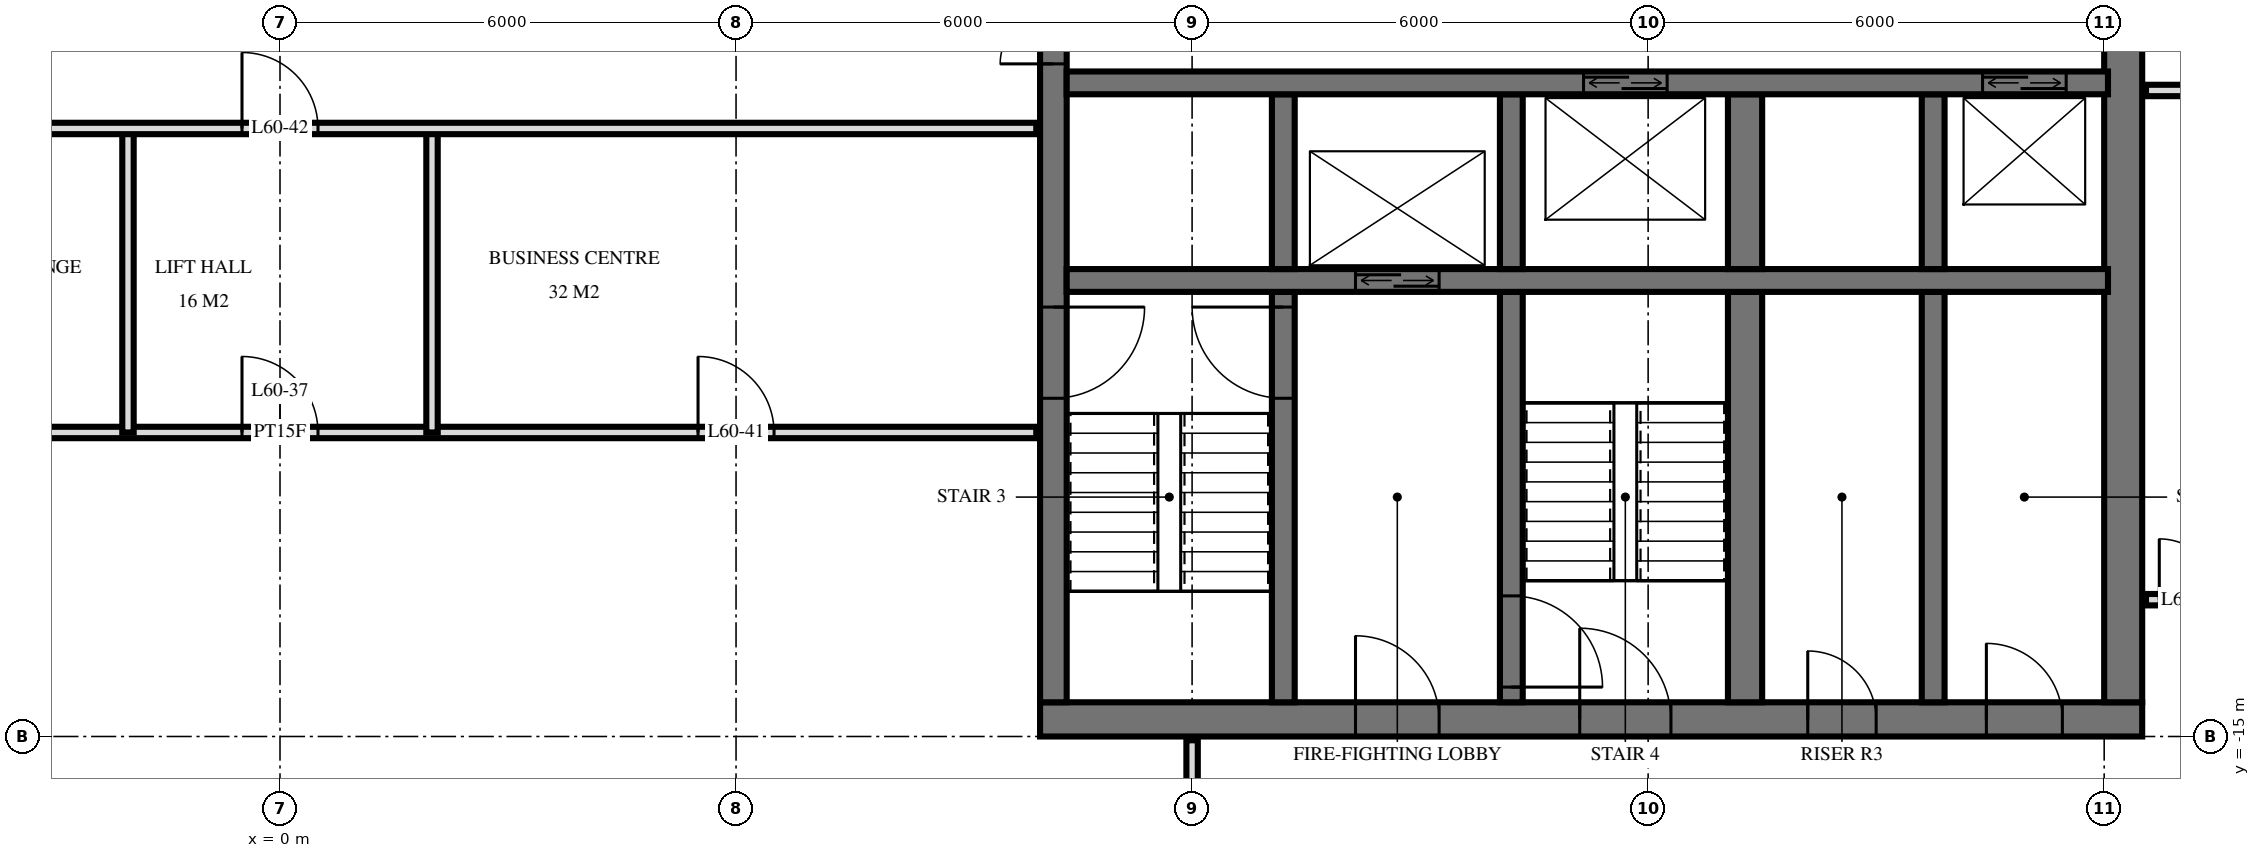
"""IFC4 building model, lengths in metres.
Left out: names, types, materials, properties, quantities, classifications, styles, units other than length and angle.
Written with IfcOpenShell. Run it as: python <this file> out.ifc"""

import sys

from ifc_helpers import new_model, si_unit, direction, frame, frame_2d, origin, place, context, subcontext, project, spatial, rectangle, extrude, element, fill, save


model = new_model("IFC4")
c1 = context("Model", 3, precision=1e-05, world=origin(), true_north=direction((0.0, 1.0)))
c2 = subcontext(c1, "Body", "Model", "MODEL_VIEW")
j1 = project(units=[si_unit("LENGTHUNIT", "METRE"), si_unit("PLANEANGLEUNIT", "RADIAN")], contexts=[c1])
p1 = place(None, origin())
s1 = spatial("IfcSite", under=j1, at=p1, CompositionType="ELEMENT")
p2 = place(p1, origin())
s2 = spatial("IfcBuilding", under=s1, at=p2, CompositionType="ELEMENT")
p3 = place(p2, frame((0.0, 0.0, 229.1)))
s3 = spatial("IfcBuildingStorey", under=s2, at=p3, CompositionType="ELEMENT", Elevation=229.1)
p4 = place(p3, frame((10.0, -14.775, 0.0), z_axis=(0.0, 0.0, 1.0), x_axis=(1.0, 0.0, 0.0)))
e1 = element("IfcWall", 1, at=p4, inside=s3, PredefinedType="SHEAR", context=c2, shape_type="SweptSolid", body=[
    extrude(rectangle(XDim=14.5, YDim=0.45, at=frame_2d((7.25, 0.0))), origin(), (0.0, 0.0, 1.0), 3.5),
])
p5 = place(p4, frame((7.1, 0.0, 0.0)))
e2 = element("IfcOpeningElement", 2, at=p5, cuts=e1, PredefinedType="OPENING", context=c2, shape_type="SweptSolid", body=[
    extrude(rectangle(XDim=1.2, YDim=2.1, at=frame_2d((0.6, 1.05))), frame((0.0, 0.235, 0.0), z_axis=(0.0, -1.0, 0.0), x_axis=(1.0, 0.0, 0.0)), (0.0, 0.0, 1.0), 0.47),
])
p6 = place(p4, frame((4.15, 0.0, 0.0)))
e3 = element("IfcOpeningElement", 3, at=p6, cuts=e1, PredefinedType="OPENING", context=c2, shape_type="SweptSolid", body=[
    extrude(rectangle(XDim=1.1, YDim=2.1, at=frame_2d((0.55, 1.05))), frame((0.0, 0.235, 0.0), z_axis=(0.0, -1.0, 0.0), x_axis=(1.0, 0.0, 0.0)), (0.0, 0.0, 1.0), 0.47),
])
p7 = place(p4, frame((10.1, 0.0, 0.0)))
e4 = element("IfcOpeningElement", 4, at=p7, cuts=e1, PredefinedType="OPENING", context=c2, shape_type="SweptSolid", body=[
    extrude(rectangle(XDim=0.9, YDim=2.1, at=frame_2d((0.45, 1.05))), frame((0.0, 0.235, 0.0), z_axis=(0.0, -1.0, 0.0), x_axis=(1.0, 0.0, 0.0)), (0.0, 0.0, 1.0), 0.47),
])
p8 = place(p4, frame((12.45, 0.0, 0.0)))
e5 = element("IfcOpeningElement", 5, at=p8, cuts=e1, PredefinedType="OPENING", context=c2, shape_type="SweptSolid", body=[
    extrude(rectangle(XDim=1.0, YDim=2.1, at=frame_2d((0.5, 1.05))), frame((0.0, 0.235, 0.0), z_axis=(0.0, -1.0, 0.0), x_axis=(1.0, 0.0, 0.0)), (0.0, 0.0, 1.0), 0.47),
])
p9 = place(p3, frame((10.175, -14.55, 0.0), z_axis=(0.0, 0.0, 1.0), x_axis=(0.0, 1.0, 0.0)))
e6 = element("IfcWall", 6, at=p9, inside=s3, PredefinedType="SHEAR", context=c2, shape_type="SweptSolid", body=[
    extrude(rectangle(XDim=14.1, YDim=0.35, at=frame_2d((7.05, 0.0))), origin(), (0.0, 0.0, 1.0), 3.5),
])
p10 = place(p9, frame((8.4, 0.0, 0.0)))
e7 = element("IfcOpeningElement", 7, at=p10, cuts=e6, PredefinedType="OPENING", context=c2, shape_type="SweptSolid", body=[
    extrude(rectangle(XDim=1.4, YDim=2.4, at=frame_2d((0.7, 1.2))), frame((0.0, 0.185, 0.0), z_axis=(0.0, -1.0, 0.0), x_axis=(1.0, 0.0, 0.0)), (0.0, 0.0, 1.0), 0.37),
])
p11 = place(p9, frame((10.0, 0.0, 0.0)))
e8 = element("IfcOpeningElement", 8, at=p11, cuts=e6, PredefinedType="OPENING", context=c2, shape_type="SweptSolid", body=[
    extrude(rectangle(XDim=1.4, YDim=2.4, at=frame_2d((0.7, 1.2))), frame((0.0, 0.185, 0.0), z_axis=(0.0, -1.0, 0.0), x_axis=(1.0, 0.0, 0.0)), (0.0, 0.0, 1.0), 0.37),
])
p12 = place(p9, frame((4.0, 0.0, 0.0)))
e9 = element("IfcOpeningElement", 9, at=p12, cuts=e6, PredefinedType="OPENING", context=c2, shape_type="SweptSolid", body=[
    extrude(rectangle(XDim=1.2, YDim=2.1, at=frame_2d((0.6, 1.05))), frame((0.0, 0.185, 0.0), z_axis=(0.0, -1.0, 0.0), x_axis=(1.0, 0.0, 0.0)), (0.0, 0.0, 1.0), 0.37),
])
p13 = place(p3, frame((24.25, -14.55, 0.0), z_axis=(0.0, 0.0, 1.0), x_axis=(0.0, 1.0, 0.0)))
e10 = element("IfcWall", 10, at=p13, inside=s3, PredefinedType="SHEAR", context=c2, shape_type="SweptSolid", body=[
    extrude(rectangle(XDim=14.1, YDim=0.5, at=frame_2d((7.05, 0.0))), origin(), (0.0, 0.0, 1.0), 3.5),
])
p14 = place(p3, frame((10.35, -6.4, 0.0), z_axis=(0.0, 0.0, 1.0), x_axis=(1.0, 0.0, 0.0)))
e11 = element("IfcWall", 11, at=p14, inside=s3, PredefinedType="SHEAR", context=c2, shape_type="SweptSolid", body=[
    extrude(rectangle(XDim=13.7, YDim=0.3, at=frame_2d((6.85, 0.0))), origin(), (0.0, 0.0, 1.0), 3.5),
])
p15 = place(p14, frame((12.05, 0.0, 0.0)))
e12 = element("IfcOpeningElement", 12, at=p15, cuts=e11, PredefinedType="OPENING", context=c2, shape_type="SweptSolid", body=[
    extrude(rectangle(XDim=1.1, YDim=2.1, at=frame_2d((0.55, 1.05))), frame((0.0, 0.16, 0.0), z_axis=(0.0, -1.0, 0.0), x_axis=(1.0, 0.0, 0.0)), (0.0, 0.0, 1.0), 0.32),
])
p16 = place(p14, frame((6.8, 0.0, 0.0)))
e13 = element("IfcOpeningElement", 13, at=p16, cuts=e11, PredefinedType="OPENING", context=c2, shape_type="SweptSolid", body=[
    extrude(rectangle(XDim=1.1, YDim=2.1, at=frame_2d((0.55, 1.05))), frame((0.0, 0.16, 0.0), z_axis=(0.0, -1.0, 0.0), x_axis=(1.0, 0.0, 0.0)), (0.0, 0.0, 1.0), 0.32),
])
p17 = place(p3, frame((10.35, -9.0, 0.0), z_axis=(0.0, 0.0, 1.0), x_axis=(1.0, 0.0, 0.0)))
e14 = element("IfcWall", 14, at=p17, inside=s3, PredefinedType="SHEAR", context=c2, shape_type="SweptSolid", body=[
    extrude(rectangle(XDim=13.7, YDim=0.3, at=frame_2d((6.85, 0.0))), origin(), (0.0, 0.0, 1.0), 3.5),
])
p18 = place(p17, frame((3.8, 0.0, 0.0)))
e15 = element("IfcOpeningElement", 15, at=p18, cuts=e14, PredefinedType="OPENING", context=c2, shape_type="SweptSolid", body=[
    extrude(rectangle(XDim=1.1, YDim=2.1, at=frame_2d((0.55, 1.05))), frame((0.0, 0.16, 0.0), z_axis=(0.0, -1.0, 0.0), x_axis=(1.0, 0.0, 0.0)), (0.0, 0.0, 1.0), 0.32),
])
p19 = place(p3, frame((13.2, -8.85, 0.0), z_axis=(0.0, 0.0, 1.0), x_axis=(0.0, 1.0, 0.0)))
e16 = element("IfcWall", 16, at=p19, inside=s3, PredefinedType="SHEAR", context=c2, shape_type="SweptSolid", body=[
    extrude(rectangle(XDim=2.3, YDim=0.3, at=frame_2d((1.15, 0.0))), origin(), (0.0, 0.0, 1.0), 3.5),
])
p20 = place(p3, frame((13.2, -14.55, 0.0), z_axis=(0.0, 0.0, 1.0), x_axis=(0.0, 1.0, 0.0)))
e17 = element("IfcWall", 17, at=p20, inside=s3, PredefinedType="SHEAR", context=c2, shape_type="SweptSolid", body=[
    extrude(rectangle(XDim=5.4, YDim=0.3, at=frame_2d((2.7, 0.0))), origin(), (0.0, 0.0, 1.0), 3.5),
])
p21 = place(p20, frame((4.0, 0.0, 0.0)))
e18 = element("IfcOpeningElement", 18, at=p21, cuts=e17, PredefinedType="OPENING", context=c2, shape_type="SweptSolid", body=[
    extrude(rectangle(XDim=1.2, YDim=2.1, at=frame_2d((0.6, 1.05))), frame((0.0, 0.16, 0.0), z_axis=(0.0, -1.0, 0.0), x_axis=(1.0, 0.0, 0.0)), (0.0, 0.0, 1.0), 0.32),
])
p22 = place(p3, frame((16.2, -8.85, 0.0), z_axis=(0.0, 0.0, 1.0), x_axis=(0.0, 1.0, 0.0)))
e19 = element("IfcWall", 19, at=p22, inside=s3, PredefinedType="SHEAR", context=c2, shape_type="SweptSolid", body=[
    extrude(rectangle(XDim=2.3, YDim=0.3, at=frame_2d((1.15, 0.0))), origin(), (0.0, 0.0, 1.0), 3.5),
])
p23 = place(p3, frame((16.2, -14.55, 0.0), z_axis=(0.0, 0.0, 1.0), x_axis=(0.0, 1.0, 0.0)))
e20 = element("IfcWall", 20, at=p23, inside=s3, PredefinedType="SHEAR", context=c2, shape_type="SweptSolid", body=[
    extrude(rectangle(XDim=5.4, YDim=0.3, at=frame_2d((2.7, 0.0))), origin(), (0.0, 0.0, 1.0), 3.5),
])
p24 = place(p23, frame((0.2, 0.0, 0.0)))
e21 = element("IfcOpeningElement", 21, at=p24, cuts=e20, PredefinedType="OPENING", context=c2, shape_type="SweptSolid", body=[
    extrude(rectangle(XDim=1.2, YDim=2.1, at=frame_2d((0.6, 1.05))), frame((0.0, 0.16, 0.0), z_axis=(0.0, -1.0, 0.0), x_axis=(1.0, 0.0, 0.0)), (0.0, 0.0, 1.0), 0.32),
])
p25 = place(p3, frame((19.275, -8.85, 0.0), z_axis=(0.0, 0.0, 1.0), x_axis=(0.0, 1.0, 0.0)))
e22 = element("IfcWall", 22, at=p25, inside=s3, PredefinedType="SHEAR", context=c2, shape_type="SweptSolid", body=[
    extrude(rectangle(XDim=2.3, YDim=0.45, at=frame_2d((1.15, 0.0))), origin(), (0.0, 0.0, 1.0), 3.5),
])
p26 = place(p3, frame((19.275, -14.55, 0.0), z_axis=(0.0, 0.0, 1.0), x_axis=(0.0, 1.0, 0.0)))
e23 = element("IfcWall", 23, at=p26, inside=s3, PredefinedType="SHEAR", context=c2, shape_type="SweptSolid", body=[
    extrude(rectangle(XDim=5.4, YDim=0.45, at=frame_2d((2.7, 0.0))), origin(), (0.0, 0.0, 1.0), 3.5),
])
p27 = place(p3, frame((21.75, -8.85, 0.0), z_axis=(0.0, 0.0, 1.0), x_axis=(0.0, 1.0, 0.0)))
e24 = element("IfcWall", 24, at=p27, inside=s3, PredefinedType="SHEAR", context=c2, shape_type="SweptSolid", body=[
    extrude(rectangle(XDim=2.3, YDim=0.3, at=frame_2d((1.15, 0.0))), origin(), (0.0, 0.0, 1.0), 3.5),
])
p28 = place(p3, frame((21.75, -14.55, 0.0), z_axis=(0.0, 0.0, 1.0), x_axis=(0.0, 1.0, 0.0)))
e25 = element("IfcWall", 25, at=p28, inside=s3, PredefinedType="SHEAR", context=c2, shape_type="SweptSolid", body=[
    extrude(rectangle(XDim=5.4, YDim=0.3, at=frame_2d((2.7, 0.0))), origin(), (0.0, 0.0, 1.0), 3.5),
])
p29 = place(p3, frame((12.0, -18.0, 0.0), z_axis=(0.0, 0.0, 1.0), x_axis=(0.0, 1.0, 0.0)))
e26 = element("IfcWall", 26, at=p29, inside=s3, PredefinedType="PARTITIONING", context=c2, shape_type="SweptSolid", body=[
    extrude(rectangle(XDim=2.95, YDim=0.15, at=frame_2d((1.475, 0.0))), origin(), (0.0, 0.0, 1.0), 3.22),
])
p30 = place(p29, frame((1.0, 0.0, 0.0)))
e27 = element("IfcOpeningElement", 27, at=p30, cuts=e26, PredefinedType="OPENING", context=c2, shape_type="SweptSolid", body=[
    extrude(rectangle(XDim=1.0, YDim=2.1, at=frame_2d((0.5, 1.05))), frame((0.0, 0.085, 0.0), z_axis=(0.0, -1.0, 0.0), x_axis=(1.0, 0.0, 0.0)), (0.0, 0.0, 1.0), 0.17),
])
for number, where, z_axis, x_axis in (
    (28, (2.0, -11.0, 0.0), (0.0, 0.0, 1.0), (0.0, 1.0, 0.0)),
    (29, (-2.0, -11.0, 0.0), (0.0, 0.0, 1.0), (0.0, 1.0, 0.0)),
):
    element("IfcWall", number, at=place(p3, frame(where, z_axis=z_axis, x_axis=x_axis)), inside=s3, PredefinedType="PARTITIONING", context=c2, shape_type="SweptSolid", body=[
        extrude(rectangle(XDim=4.0, YDim=0.15, at=frame_2d((2.0, 0.0))), origin(), (0.0, 0.0, 1.0), 3.22),
    ])
p31 = place(p3, frame((24.55, -13.2, 0.0), z_axis=(0.0, 0.0, 1.0), x_axis=(1.0, 0.0, 0.0)))
e30 = element("IfcWall", 30, at=p31, inside=s3, PredefinedType="PARTITIONING", context=c2, shape_type="SweptSolid", body=[
    extrude(rectangle(XDim=1.15, YDim=0.15, at=frame_2d((0.575, 0.0))), origin(), (0.0, 0.0, 1.0), 3.22),
])
p32 = place(p31, frame((0.175, 0.0, 0.0)))
e31 = element("IfcOpeningElement", 31, at=p32, cuts=e30, PredefinedType="OPENING", context=c2, shape_type="SweptSolid", body=[
    extrude(rectangle(XDim=0.8, YDim=2.1, at=frame_2d((0.4, 1.05))), frame((0.0, 0.085, 0.0), z_axis=(0.0, -1.0, 0.0), x_axis=(1.0, 0.0, 0.0)), (0.0, 0.0, 1.0), 0.17),
])
p33 = place(p3, frame((-9.95, -11.0, 0.0), z_axis=(0.0, 0.0, 1.0), x_axis=(1.0, 0.0, 0.0)))
e32 = element("IfcWall", 32, at=p33, inside=s3, PredefinedType="PARTITIONING", context=c2, shape_type="SweptSolid", body=[
    extrude(rectangle(XDim=19.9, YDim=0.15, at=frame_2d((9.95, 0.0))), origin(), (0.0, 0.0, 1.0), 3.22),
])
p34 = place(p33, frame((9.45, 0.0, 0.0)))
e33 = element("IfcOpeningElement", 33, at=p34, cuts=e32, PredefinedType="OPENING", context=c2, shape_type="SweptSolid", body=[
    extrude(rectangle(XDim=1.0, YDim=2.1, at=frame_2d((0.5, 1.05))), frame((0.0, 0.085, 0.0), z_axis=(0.0, -1.0, 0.0), x_axis=(1.0, 0.0, 0.0)), (0.0, 0.0, 1.0), 0.17),
])
p35 = place(p33, frame((15.45, 0.0, 0.0)))
e34 = element("IfcOpeningElement", 34, at=p35, cuts=e32, PredefinedType="OPENING", context=c2, shape_type="SweptSolid", body=[
    extrude(rectangle(XDim=1.0, YDim=2.1, at=frame_2d((0.5, 1.05))), frame((0.0, 0.085, 0.0), z_axis=(0.0, -1.0, 0.0), x_axis=(1.0, 0.0, 0.0)), (0.0, 0.0, 1.0), 0.17),
])
p36 = place(p3, frame((-9.95, -7.0, 0.0), z_axis=(0.0, 0.0, 1.0), x_axis=(1.0, 0.0, 0.0)))
e35 = element("IfcWall", 35, at=p36, inside=s3, PredefinedType="PARTITIONING", context=c2, shape_type="SweptSolid", body=[
    extrude(rectangle(XDim=19.9, YDim=0.15, at=frame_2d((9.95, 0.0))), origin(), (0.0, 0.0, 1.0), 3.22),
])
p37 = place(p36, frame((9.45, 0.0, 0.0)))
e36 = element("IfcOpeningElement", 36, at=p37, cuts=e35, PredefinedType="OPENING", context=c2, shape_type="SweptSolid", body=[
    extrude(rectangle(XDim=1.0, YDim=2.1, at=frame_2d((0.5, 1.05))), frame((0.0, 0.085, 0.0), z_axis=(0.0, -1.0, 0.0), x_axis=(1.0, 0.0, 0.0)), (0.0, 0.0, 1.0), 0.17),
])
p38 = place(p36, frame((3.45, 0.0, 0.0)))
e37 = element("IfcOpeningElement", 37, at=p38, cuts=e35, PredefinedType="OPENING", context=c2, shape_type="SweptSolid", body=[
    extrude(rectangle(XDim=1.0, YDim=2.1, at=frame_2d((0.5, 1.05))), frame((0.0, 0.085, 0.0), z_axis=(0.0, -1.0, 0.0), x_axis=(1.0, 0.0, 0.0)), (0.0, 0.0, 1.0), 0.17),
])
p39 = place(p3, frame((24.55, -6.5, 0.0), z_axis=(0.0, 0.0, 1.0), x_axis=(1.0, 0.0, 0.0)))
e38 = element("IfcWall", 38, at=p39, inside=s3, PredefinedType="PLUMBINGWALL", context=c2, shape_type="SweptSolid", body=[
    extrude(rectangle(XDim=2.27, YDim=0.15, at=frame_2d((1.135, 0.0))), origin(), (0.0, 0.0, 1.0), 3.22),
])
p40 = place(p39, frame((0.75, 0.0, 0.0)))
e39 = element("IfcOpeningElement", 39, at=p40, cuts=e38, PredefinedType="OPENING", context=c2, shape_type="SweptSolid", body=[
    extrude(rectangle(XDim=0.9, YDim=2.1, at=frame_2d((0.45, 1.05))), frame((0.0, 0.085, 0.0), z_axis=(0.0, -1.0, 0.0), x_axis=(1.0, 0.0, 0.0)), (0.0, 0.0, 1.0), 0.17),
])
p41 = place(p15, origin())
e40 = element("IfcDoor", 40, at=p41, inside=s3, OperationType="DOUBLE_DOOR_SLIDING", PredefinedType="USERDEFINED", context=c2, shape_type="SweptSolid", body=[
    extrude(rectangle(XDim=1.1, YDim=2.1, at=frame_2d((0.55, 1.05))), frame((0.0, 0.025, 0.0), z_axis=(0.0, -1.0, 0.0), x_axis=(1.0, 0.0, 0.0)), (0.0, 0.0, 1.0), 0.05),
])
fill(e12, e40)
p42 = place(p18, origin())
e41 = element("IfcDoor", 41, at=p42, inside=s3, OperationType="DOUBLE_DOOR_SLIDING", PredefinedType="USERDEFINED", context=c2, shape_type="SweptSolid", body=[
    extrude(rectangle(XDim=1.1, YDim=2.1, at=frame_2d((0.55, 1.05))), frame((0.0, 0.025, 0.0), z_axis=(0.0, -1.0, 0.0), x_axis=(1.0, 0.0, 0.0)), (0.0, 0.0, 1.0), 0.05),
])
fill(e15, e41)
p43 = place(p16, origin())
e42 = element("IfcDoor", 42, at=p43, inside=s3, OperationType="DOUBLE_DOOR_SLIDING", PredefinedType="USERDEFINED", context=c2, shape_type="SweptSolid", body=[
    extrude(rectangle(XDim=1.1, YDim=2.1, at=frame_2d((0.55, 1.05))), frame((0.0, 0.025, 0.0), z_axis=(0.0, -1.0, 0.0), x_axis=(1.0, 0.0, 0.0)), (0.0, 0.0, 1.0), 0.05),
])
fill(e13, e42)
p44 = place(p10, origin())
e43 = element("IfcDoor", 43, at=p44, inside=s3, OperationType="DOUBLE_DOOR_SINGLE_SWING", PredefinedType="DOOR", context=c2, shape_type="SweptSolid", body=[
    extrude(rectangle(XDim=1.4, YDim=2.4, at=frame_2d((0.7, 1.2))), frame((0.0, 0.025, 0.0), z_axis=(0.0, -1.0, 0.0), x_axis=(1.0, 0.0, 0.0)), (0.0, 0.0, 1.0), 0.05),
])
fill(e7, e43)
p45 = place(p12, frame((0.6, 0.0, 0.0), z_axis=(0.0, 0.0, 1.0), x_axis=(-1.0, 0.0, 0.0)))
e44 = element("IfcDoor", 44, at=p45, inside=s3, OperationType="SINGLE_SWING_RIGHT", PredefinedType="DOOR", context=c2, shape_type="SweptSolid", body=[
    extrude(rectangle(XDim=1.2, YDim=2.1, at=frame_2d((0.0, 1.05))), frame((0.0, -0.025, 0.0), z_axis=(0.0, 1.0, 0.0), x_axis=(-1.0, 0.0, 0.0)), (0.0, 0.0, 1.0), 0.05),
])
fill(e9, e44)
p46 = place(p5, origin())
e45 = element("IfcDoor", 45, at=p46, inside=s3, OperationType="SINGLE_SWING_RIGHT", PredefinedType="DOOR", context=c2, shape_type="SweptSolid", body=[
    extrude(rectangle(XDim=1.2, YDim=2.1, at=frame_2d((0.6, 1.05))), frame((0.0, 0.025, 0.0), z_axis=(0.0, -1.0, 0.0), x_axis=(1.0, 0.0, 0.0)), (0.0, 0.0, 1.0), 0.05),
])
fill(e2, e45)
p47 = place(p6, origin())
e46 = element("IfcDoor", 46, at=p47, inside=s3, OperationType="SINGLE_SWING_RIGHT", PredefinedType="DOOR", context=c2, shape_type="SweptSolid", body=[
    extrude(rectangle(XDim=1.1, YDim=2.1, at=frame_2d((0.55, 1.05))), frame((0.0, 0.025, 0.0), z_axis=(0.0, -1.0, 0.0), x_axis=(1.0, 0.0, 0.0)), (0.0, 0.0, 1.0), 0.05),
])
fill(e3, e46)
p48 = place(p7, origin())
e47 = element("IfcDoor", 47, at=p48, inside=s3, OperationType="SINGLE_SWING_RIGHT", PredefinedType="DOOR", context=c2, shape_type="SweptSolid", body=[
    extrude(rectangle(XDim=0.9, YDim=2.1, at=frame_2d((0.45, 1.05))), frame((0.0, 0.025, 0.0), z_axis=(0.0, -1.0, 0.0), x_axis=(1.0, 0.0, 0.0)), (0.0, 0.0, 1.0), 0.05),
])
fill(e4, e47)
p49 = place(p8, origin())
e48 = element("IfcDoor", 48, at=p49, inside=s3, OperationType="SINGLE_SWING_RIGHT", PredefinedType="DOOR", context=c2, shape_type="SweptSolid", body=[
    extrude(rectangle(XDim=1.0, YDim=2.1, at=frame_2d((0.5, 1.05))), frame((0.0, 0.025, 0.0), z_axis=(0.0, -1.0, 0.0), x_axis=(1.0, 0.0, 0.0)), (0.0, 0.0, 1.0), 0.05),
])
fill(e5, e48)
p50 = place(p21, origin())
e49 = element("IfcDoor", 49, at=p50, inside=s3, OperationType="SINGLE_SWING_LEFT", PredefinedType="DOOR", context=c2, shape_type="SweptSolid", body=[
    extrude(rectangle(XDim=1.2, YDim=2.1, at=frame_2d((0.6, 1.05))), frame((0.0, 0.025, 0.0), z_axis=(0.0, -1.0, 0.0), x_axis=(1.0, 0.0, 0.0)), (0.0, 0.0, 1.0), 0.05),
])
fill(e18, e49)
p51 = place(p24, frame((0.6, 0.0, 0.0), z_axis=(0.0, 0.0, 1.0), x_axis=(-1.0, 0.0, 0.0)))
e50 = element("IfcDoor", 50, at=p51, inside=s3, OperationType="SINGLE_SWING_LEFT", PredefinedType="DOOR", context=c2, shape_type="SweptSolid", body=[
    extrude(rectangle(XDim=1.2, YDim=2.1, at=frame_2d((0.0, 1.05))), frame((0.0, -0.025, 0.0), z_axis=(0.0, 1.0, 0.0), x_axis=(-1.0, 0.0, 0.0)), (0.0, 0.0, 1.0), 0.05),
])
fill(e21, e50)
p52 = place(p32, origin())
e51 = element("IfcDoor", 51, at=p52, inside=s3, OperationType="SINGLE_SWING_RIGHT", PredefinedType="DOOR", context=c2, shape_type="SweptSolid", body=[
    extrude(rectangle(XDim=0.8, YDim=2.1, at=frame_2d((0.4, 1.05))), frame((0.0, 0.025, 0.0), z_axis=(0.0, -1.0, 0.0), x_axis=(1.0, 0.0, 0.0)), (0.0, 0.0, 1.0), 0.05),
])
fill(e31, e51)
p53 = place(p34, origin())
e52 = element("IfcDoor", 52, at=p53, inside=s3, OperationType="SINGLE_SWING_RIGHT", PredefinedType="DOOR", context=c2, shape_type="SweptSolid", body=[
    extrude(rectangle(XDim=1.0, YDim=2.1, at=frame_2d((0.5, 1.05))), frame((0.0, 0.025, 0.0), z_axis=(0.0, -1.0, 0.0), x_axis=(1.0, 0.0, 0.0)), (0.0, 0.0, 1.0), 0.05),
])
fill(e33, e52)
p54 = place(p35, origin())
e53 = element("IfcDoor", 53, at=p54, inside=s3, OperationType="SINGLE_SWING_RIGHT", PredefinedType="DOOR", context=c2, shape_type="SweptSolid", body=[
    extrude(rectangle(XDim=1.0, YDim=2.1, at=frame_2d((0.5, 1.05))), frame((0.0, 0.025, 0.0), z_axis=(0.0, -1.0, 0.0), x_axis=(1.0, 0.0, 0.0)), (0.0, 0.0, 1.0), 0.05),
])
fill(e34, e53)
p55 = place(p37, origin())
e54 = element("IfcDoor", 54, at=p55, inside=s3, OperationType="SINGLE_SWING_RIGHT", PredefinedType="DOOR", context=c2, shape_type="SweptSolid", body=[
    extrude(rectangle(XDim=1.0, YDim=2.1, at=frame_2d((0.5, 1.05))), frame((0.0, 0.025, 0.0), z_axis=(0.0, -1.0, 0.0), x_axis=(1.0, 0.0, 0.0)), (0.0, 0.0, 1.0), 0.05),
])
fill(e36, e54)
save(model, sys.argv[1])
